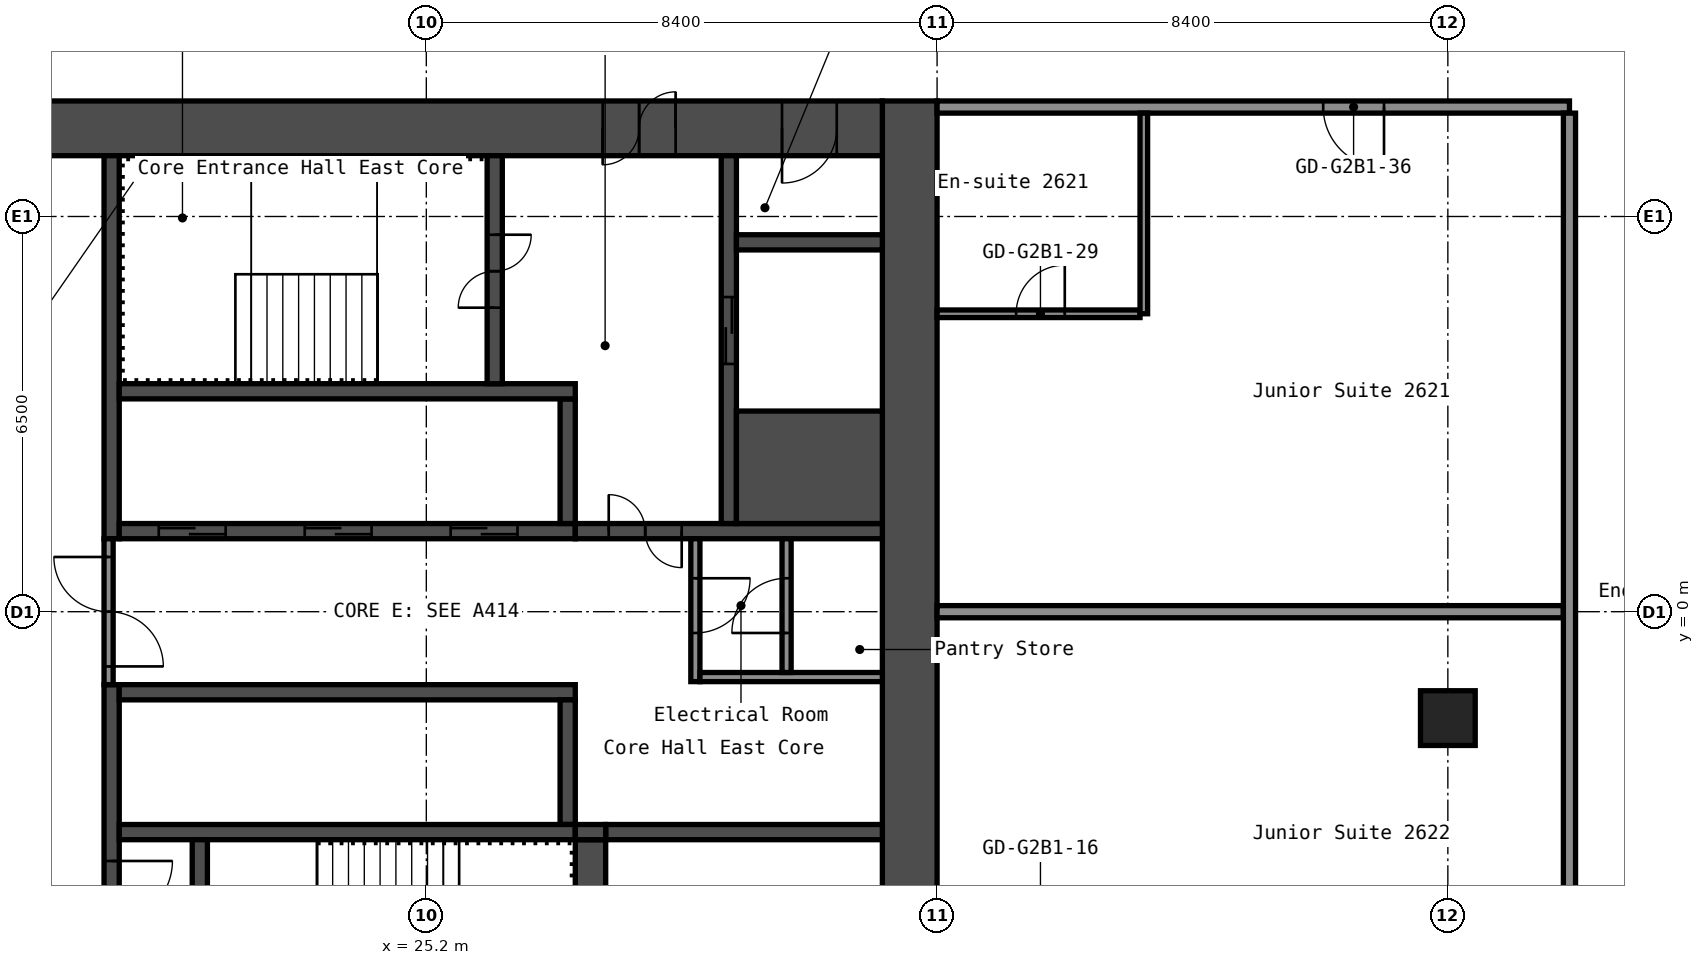
"""IFC4 building model, lengths in metres.
Left out: names, types, materials, properties, quantities, classifications, styles, units other than length and angle.
Written with IfcOpenShell. Run it as: python <this file> out.ifc"""

import sys

from ifc_helpers import new_model, si_unit, direction, frame, frame_2d, origin, origin_2d, place, context, subcontext, project, spatial, rectangle, hollow_rectangle, extrude, element, fill, save


model = new_model("IFC4")
c1 = context("Model", 3, precision=1e-05, world=origin(), true_north=direction((0.0, 1.0)))
c2 = subcontext(c1, "Body", "Model", "MODEL_VIEW")
j1 = project(units=[si_unit("LENGTHUNIT", "METRE"), si_unit("PLANEANGLEUNIT", "RADIAN")], contexts=[c1])
p1 = place(None, origin())
s1 = spatial("IfcSite", under=j1, at=p1, CompositionType="ELEMENT")
p2 = place(p1, origin())
s2 = spatial("IfcBuilding", under=s1, at=p2, CompositionType="ELEMENT")
p3 = place(p2, frame((0.0, 0.0, 94.6)))
s3 = spatial("IfcBuildingStorey", under=s2, at=p3, CompositionType="ELEMENT", Elevation=94.6)
p4 = place(p3, frame((42.0, -1.75, 0.0), z_axis=(0.0, 0.0, 1.0), x_axis=(1.0, 0.0, 0.0)))
e1 = element("IfcColumn", 1, at=p4, inside=s3, PredefinedType="COLUMN", context=c2, shape_type="SweptSolid", body=[
    extrude(hollow_rectangle(XDim=0.9, YDim=0.9, WallThickness=0.036, at=origin_2d()), origin(), (0.0, 0.0, 1.0), 2.8),
])
p5 = place(p3, frame((33.15, -8.4, 0.0), z_axis=(0.0, 0.0, 1.0), x_axis=(0.0, 1.0, 0.0)))
e2 = element("IfcWall", 2, at=p5, inside=s3, PredefinedType="SHEAR", context=c2, shape_type="SweptSolid", body=[
    extrude(rectangle(XDim=16.8, YDim=0.9, at=frame_2d((8.4, 0.0))), origin(), (0.0, 0.0, 1.0), 2.8),
])
p6 = place(p3, frame((17.7, 7.95, 0.0), z_axis=(0.0, 0.0, 1.0), x_axis=(1.0, 0.0, 0.0)))
e3 = element("IfcWall", 3, at=p6, inside=s3, PredefinedType="SHEAR", context=c2, shape_type="SweptSolid", body=[
    extrude(rectangle(XDim=15.0, YDim=0.9, at=frame_2d((7.5, 0.0))), origin(), (0.0, 0.0, 1.0), 2.8),
])
p7 = place(p6, frame((10.4, 0.0, 0.0)))
e4 = element("IfcOpeningElement", 4, at=p7, cuts=e3, PredefinedType="OPENING", context=c2, shape_type="SweptSolid", body=[
    extrude(rectangle(XDim=1.2, YDim=2.1, at=frame_2d((0.6, 1.05))), frame((0.0, 0.46, 0.0), z_axis=(0.0, -1.0, 0.0), x_axis=(1.0, 0.0, 0.0)), (0.0, 0.0, 1.0), 0.92),
])
p8 = place(p6, frame((13.35, 0.0, 0.0)))
e5 = element("IfcOpeningElement", 5, at=p8, cuts=e3, PredefinedType="OPENING", context=c2, shape_type="SweptSolid", body=[
    extrude(rectangle(XDim=0.9, YDim=2.1, at=frame_2d((0.45, 1.05))), frame((0.0, 0.46, 0.0), z_axis=(0.0, -1.0, 0.0), x_axis=(1.0, 0.0, 0.0)), (0.0, 0.0, 1.0), 0.92),
])
p9 = place(p3, frame((20.025, 1.2, 0.0), z_axis=(0.0, 0.0, 1.0), x_axis=(0.0, 1.0, 0.0)))
e6 = element("IfcWall", 6, at=p9, inside=s3, PredefinedType="SHEAR", context=c2, shape_type="SweptSolid", body=[
    extrude(rectangle(XDim=6.3, YDim=0.25, at=frame_2d((3.15, 0.0))), origin(), (0.0, 0.0, 1.0), 2.8),
])
p10 = place(p3, frame((20.025, -7.5, 0.0), z_axis=(0.0, 0.0, 1.0), x_axis=(0.0, 1.0, 0.0)))
e7 = element("IfcWall", 7, at=p10, inside=s3, PredefinedType="SHEAR", context=c2, shape_type="SweptSolid", body=[
    extrude(rectangle(XDim=6.3, YDim=0.25, at=frame_2d((3.15, 0.0))), origin(), (0.0, 0.0, 1.0), 2.8),
])
p11 = place(p10, frame((2.4, 0.0, 0.0)))
e8 = element("IfcOpeningElement", 8, at=p11, cuts=e7, PredefinedType="OPENING", context=c2, shape_type="SweptSolid", body=[
    extrude(rectangle(XDim=1.0, YDim=2.1, at=frame_2d((0.5, 1.05))), frame((0.0, 0.135, 0.0), z_axis=(0.0, -1.0, 0.0), x_axis=(1.0, 0.0, 0.0)), (0.0, 0.0, 1.0), 0.27),
])
p12 = place(p3, frame((20.15, 1.325, 0.0), z_axis=(0.0, 0.0, 1.0), x_axis=(1.0, 0.0, 0.0)))
e9 = element("IfcWall", 9, at=p12, inside=s3, PredefinedType="SHEAR", context=c2, shape_type="SweptSolid", body=[
    extrude(rectangle(XDim=7.5, YDim=0.25, at=frame_2d((3.75, 0.0))), origin(), (0.0, 0.0, 1.0), 2.8),
])
p13 = place(p12, frame((0.65, 0.0, 0.0)))
e10 = element("IfcOpeningElement", 10, at=p13, cuts=e9, PredefinedType="OPENING", context=c2, shape_type="SweptSolid", body=[
    extrude(rectangle(XDim=1.1, YDim=2.1, at=frame_2d((0.55, 1.05))), frame((0.0, 0.135, 0.0), z_axis=(0.0, -1.0, 0.0), x_axis=(1.0, 0.0, 0.0)), (0.0, 0.0, 1.0), 0.27),
])
p14 = place(p12, frame((3.05, 0.0, 0.0)))
e11 = element("IfcOpeningElement", 11, at=p14, cuts=e9, PredefinedType="OPENING", context=c2, shape_type="SweptSolid", body=[
    extrude(rectangle(XDim=1.1, YDim=2.1, at=frame_2d((0.55, 1.05))), frame((0.0, 0.135, 0.0), z_axis=(0.0, -1.0, 0.0), x_axis=(1.0, 0.0, 0.0)), (0.0, 0.0, 1.0), 0.27),
])
p15 = place(p12, frame((5.45, 0.0, 0.0)))
e12 = element("IfcOpeningElement", 12, at=p15, cuts=e9, PredefinedType="OPENING", context=c2, shape_type="SweptSolid", body=[
    extrude(rectangle(XDim=1.1, YDim=2.1, at=frame_2d((0.55, 1.05))), frame((0.0, 0.135, 0.0), z_axis=(0.0, -1.0, 0.0), x_axis=(1.0, 0.0, 0.0)), (0.0, 0.0, 1.0), 0.27),
])
p16 = place(p3, frame((27.525, 1.45, 0.0), z_axis=(0.0, 0.0, 1.0), x_axis=(0.0, 1.0, 0.0)))
e13 = element("IfcWall", 13, at=p16, inside=s3, PredefinedType="SHEAR", context=c2, shape_type="SweptSolid", body=[
    extrude(rectangle(XDim=2.05, YDim=0.25, at=frame_2d((1.025, 0.0))), origin(), (0.0, 0.0, 1.0), 2.8),
])
p17 = place(p3, frame((20.15, 3.625, 0.0), z_axis=(0.0, 0.0, 1.0), x_axis=(1.0, 0.0, 0.0)))
e14 = element("IfcWall", 14, at=p17, inside=s3, PredefinedType="SHEAR", context=c2, shape_type="SweptSolid", body=[
    extrude(rectangle(XDim=7.5, YDim=0.25, at=frame_2d((3.75, 0.0))), origin(), (0.0, 0.0, 1.0), 2.8),
])
p18 = place(p3, frame((26.325, 3.75, 0.0), z_axis=(0.0, 0.0, 1.0), x_axis=(0.0, 1.0, 0.0)))
e15 = element("IfcWall", 15, at=p18, inside=s3, PredefinedType="SHEAR", context=c2, shape_type="SweptSolid", body=[
    extrude(rectangle(XDim=3.75, YDim=0.25, at=frame_2d((1.875, 0.0))), origin(), (0.0, 0.0, 1.0), 2.8),
])
p19 = place(p18, frame((1.25, 0.0, 0.0)))
e16 = element("IfcOpeningElement", 16, at=p19, cuts=e15, PredefinedType="OPENING", context=c2, shape_type="SweptSolid", body=[
    extrude(rectangle(XDim=1.2, YDim=2.1, at=frame_2d((0.6, 1.05))), frame((0.0, 0.135, 0.0), z_axis=(0.0, -1.0, 0.0), x_axis=(1.0, 0.0, 0.0)), (0.0, 0.0, 1.0), 0.27),
])
p20 = place(p3, frame((27.65, 1.325, 0.0), z_axis=(0.0, 0.0, 1.0), x_axis=(1.0, 0.0, 0.0)))
e17 = element("IfcWall", 17, at=p20, inside=s3, PredefinedType="SHEAR", context=c2, shape_type="SweptSolid", body=[
    extrude(rectangle(XDim=5.05, YDim=0.25, at=frame_2d((2.525, 0.0))), origin(), (0.0, 0.0, 1.0), 2.8),
])
p21 = place(p20, frame((0.55, 0.0, 0.0)))
e18 = element("IfcOpeningElement", 18, at=p21, cuts=e17, PredefinedType="OPENING", context=c2, shape_type="SweptSolid", body=[
    extrude(rectangle(XDim=1.2, YDim=2.1, at=frame_2d((0.6, 1.05))), frame((0.0, 0.135, 0.0), z_axis=(0.0, -1.0, 0.0), x_axis=(1.0, 0.0, 0.0)), (0.0, 0.0, 1.0), 0.27),
])
p22 = place(p3, frame((30.175, 1.45, 0.0), z_axis=(0.0, 0.0, 1.0), x_axis=(0.0, 1.0, 0.0)))
e19 = element("IfcWall", 19, at=p22, inside=s3, PredefinedType="SHEAR", context=c2, shape_type="SweptSolid", body=[
    extrude(rectangle(XDim=6.05, YDim=0.25, at=frame_2d((3.025, 0.0))), origin(), (0.0, 0.0, 1.0), 2.8),
])
p23 = place(p22, frame((2.625, 0.0, 0.0)))
e20 = element("IfcOpeningElement", 20, at=p23, cuts=e19, PredefinedType="OPENING", context=c2, shape_type="SweptSolid", body=[
    extrude(rectangle(XDim=1.1, YDim=2.1, at=frame_2d((0.55, 1.05))), frame((0.0, 0.135, 0.0), z_axis=(0.0, -1.0, 0.0), x_axis=(1.0, 0.0, 0.0)), (0.0, 0.0, 1.0), 0.27),
])
p24 = place(p3, frame((30.3, 2.375, 0.0), z_axis=(0.0, 0.0, 1.0), x_axis=(1.0, 0.0, 0.0)))
e21 = element("IfcWall", 21, at=p24, inside=s3, PredefinedType="SHEAR", context=c2, shape_type="SweptSolid", body=[
    extrude(rectangle(XDim=2.4, YDim=1.85, at=frame_2d((1.2, 0.0))), origin(), (0.0, 0.0, 1.0), 2.8),
])
p25 = place(p3, frame((30.3, 6.075, 0.0), z_axis=(0.0, 0.0, 1.0), x_axis=(1.0, 0.0, 0.0)))
e22 = element("IfcWall", 22, at=p25, inside=s3, PredefinedType="SHEAR", context=c2, shape_type="SweptSolid", body=[
    extrude(rectangle(XDim=2.4, YDim=0.25, at=frame_2d((1.2, 0.0))), origin(), (0.0, 0.0, 1.0), 2.8),
])
p26 = place(p3, frame((20.15, -1.325, 0.0), z_axis=(0.0, 0.0, 1.0), x_axis=(1.0, 0.0, 0.0)))
e23 = element("IfcWall", 23, at=p26, inside=s3, PredefinedType="SHEAR", context=c2, shape_type="SweptSolid", body=[
    extrude(rectangle(XDim=7.5, YDim=0.25, at=frame_2d((3.75, 0.0))), origin(), (0.0, 0.0, 1.0), 2.8),
])
p27 = place(p3, frame((27.525, -3.5, 0.0), z_axis=(0.0, 0.0, 1.0), x_axis=(0.0, 1.0, 0.0)))
e24 = element("IfcWall", 24, at=p27, inside=s3, PredefinedType="SHEAR", context=c2, shape_type="SweptSolid", body=[
    extrude(rectangle(XDim=2.05, YDim=0.25, at=frame_2d((1.025, 0.0))), origin(), (0.0, 0.0, 1.0), 2.8),
])
p28 = place(p3, frame((20.15, -3.625, 0.0), z_axis=(0.0, 0.0, 1.0), x_axis=(1.0, 0.0, 0.0)))
e25 = element("IfcWall", 25, at=p28, inside=s3, PredefinedType="SHEAR", context=c2, shape_type="SweptSolid", body=[
    extrude(rectangle(XDim=7.5, YDim=0.25, at=frame_2d((3.75, 0.0))), origin(), (0.0, 0.0, 1.0), 2.8),
])
p29 = place(p3, frame((21.475, -7.5, 0.0), z_axis=(0.0, 0.0, 1.0), x_axis=(0.0, 1.0, 0.0)))
e26 = element("IfcWall", 26, at=p29, inside=s3, PredefinedType="SHEAR", context=c2, shape_type="SweptSolid", body=[
    extrude(rectangle(XDim=3.75, YDim=0.25, at=frame_2d((1.875, 0.0))), origin(), (0.0, 0.0, 1.0), 2.8),
])
p30 = place(p29, frame((1.3, 0.0, 0.0)))
e27 = element("IfcOpeningElement", 27, at=p30, cuts=e26, PredefinedType="OPENING", context=c2, shape_type="SweptSolid", body=[
    extrude(rectangle(XDim=1.2, YDim=2.1, at=frame_2d((0.6, 1.05))), frame((0.0, 0.135, 0.0), z_axis=(0.0, -1.0, 0.0), x_axis=(1.0, 0.0, 0.0)), (0.0, 0.0, 1.0), 0.27),
])
p31 = place(p3, frame((27.9, -7.5, 0.0), z_axis=(0.0, 0.0, 1.0), x_axis=(0.0, 1.0, 0.0)))
e28 = element("IfcWall", 28, at=p31, inside=s3, PredefinedType="SHEAR", context=c2, shape_type="SweptSolid", body=[
    extrude(rectangle(XDim=3.75, YDim=0.5, at=frame_2d((1.875, 0.0))), origin(), (0.0, 0.0, 1.0), 2.8),
])
p32 = place(p3, frame((28.15, -3.625, 0.0), z_axis=(0.0, 0.0, 1.0), x_axis=(1.0, 0.0, 0.0)))
e29 = element("IfcWall", 29, at=p32, inside=s3, PredefinedType="SHEAR", context=c2, shape_type="SweptSolid", body=[
    extrude(rectangle(XDim=4.55, YDim=0.25, at=frame_2d((2.275, 0.0))), origin(), (0.0, 0.0, 1.0), 2.8),
])
p33 = place(p3, frame((27.65, -3.625, 0.0), z_axis=(0.0, 0.0, 1.0), x_axis=(1.0, 0.0, 0.0)))
e30 = element("IfcWall", 30, at=p33, inside=s3, PredefinedType="SHEAR", context=c2, shape_type="SweptSolid", body=[
    extrude(rectangle(XDim=0.5, YDim=0.25, at=frame_2d((0.25, 0.0))), origin(), (0.0, 0.0, 1.0), 2.8),
])
p34 = place(p3, frame((19.975, -1.2, 0.0), z_axis=(0.0, 0.0, 1.0), x_axis=(0.0, 1.0, 0.0)))
e31 = element("IfcWall", 31, at=p34, inside=s3, PredefinedType="PARTITIONING", context=c2, shape_type="SweptSolid", body=[
    extrude(rectangle(XDim=2.4, YDim=0.15, at=frame_2d((1.2, 0.0))), origin(), (0.0, 0.0, 1.0), 2.8),
])
p35 = place(p34, frame((0.3, 0.0, 0.0)))
e32 = element("IfcOpeningElement", 32, at=p35, cuts=e31, PredefinedType="OPENING", context=c2, shape_type="SweptSolid", body=[
    extrude(rectangle(XDim=1.8, YDim=2.1, at=frame_2d((0.9, 1.05))), frame((0.0, 0.085, 0.0), z_axis=(0.0, -1.0, 0.0), x_axis=(1.0, 0.0, 0.0)), (0.0, 0.0, 1.0), 0.17),
])
p36 = place(p3, frame((29.625, -1.15, 0.0), z_axis=(0.0, 0.0, 1.0), x_axis=(0.0, 1.0, 0.0)))
e33 = element("IfcWall", 33, at=p36, inside=s3, PredefinedType="PARTITIONING", context=c2, shape_type="SweptSolid", body=[
    extrude(rectangle(XDim=2.35, YDim=0.15, at=frame_2d((1.175, 0.0))), origin(), (0.0, 0.0, 1.0), 2.8),
])
p37 = place(p36, frame((0.8, 0.0, 0.0)))
e34 = element("IfcOpeningElement", 34, at=p37, cuts=e33, PredefinedType="OPENING", context=c2, shape_type="SweptSolid", body=[
    extrude(rectangle(XDim=0.9, YDim=2.1, at=frame_2d((0.45, 1.05))), frame((0.0, 0.085, 0.0), z_axis=(0.0, -1.0, 0.0), x_axis=(1.0, 0.0, 0.0)), (0.0, 0.0, 1.0), 0.17),
])
p38 = place(p3, frame((29.7, -1.075, 0.0), z_axis=(0.0, 0.0, 1.0), x_axis=(1.0, 0.0, 0.0)))
e35 = element("IfcWall", 35, at=p38, inside=s3, PredefinedType="PARTITIONING", context=c2, shape_type="SweptSolid", body=[
    extrude(rectangle(XDim=3.0, YDim=0.15, at=frame_2d((1.5, 0.0))), origin(), (0.0, 0.0, 1.0), 2.8),
])
p39 = place(p3, frame((31.125, -1.0, 0.0), z_axis=(0.0, 0.0, 1.0), x_axis=(0.0, 1.0, 0.0)))
e36 = element("IfcWall", 36, at=p39, inside=s3, PredefinedType="PARTITIONING", context=c2, shape_type="SweptSolid", body=[
    extrude(rectangle(XDim=2.2, YDim=0.15, at=frame_2d((1.1, 0.0))), origin(), (0.0, 0.0, 1.0), 2.8),
])
p40 = place(p39, frame((0.65, 0.0, 0.0)))
e37 = element("IfcOpeningElement", 37, at=p40, cuts=e36, PredefinedType="OPENING", context=c2, shape_type="SweptSolid", body=[
    extrude(rectangle(XDim=0.9, YDim=2.1, at=frame_2d((0.45, 1.05))), frame((0.0, 0.085, 0.0), z_axis=(0.0, -1.0, 0.0), x_axis=(1.0, 0.0, 0.0)), (0.0, 0.0, 1.0), 0.17),
])
p41 = place(p3, frame((33.6, 0.0, 0.0), z_axis=(0.0, 0.0, 1.0), x_axis=(1.0, 0.0, 0.0)))
e38 = element("IfcWall", 38, at=p41, inside=s3, PredefinedType="PARTITIONING", context=c2, shape_type="SweptSolid", body=[
    extrude(rectangle(XDim=10.3, YDim=0.2, at=frame_2d((5.15, 0.0))), origin(), (0.0, 0.0, 1.0), 2.8),
])
p42 = place(p3, frame((33.6, 4.9, 0.0), z_axis=(0.0, 0.0, 1.0), x_axis=(1.0, 0.0, 0.0)))
e39 = element("IfcWall", 39, at=p42, inside=s3, PredefinedType="PARTITIONING", context=c2, shape_type="SweptSolid", body=[
    extrude(rectangle(XDim=3.337, YDim=0.125, at=frame_2d((1.669, 0.0))), origin(), (0.0, 0.0, 1.0), 2.8),
])
p43 = place(p42, frame((1.3, 0.0, 0.0)))
e40 = element("IfcOpeningElement", 40, at=p43, cuts=e39, PredefinedType="OPENING", context=c2, shape_type="SweptSolid", body=[
    extrude(rectangle(XDim=0.8, YDim=2.1, at=frame_2d((0.4, 1.05))), frame((0.0, 0.073, 0.0), z_axis=(0.0, -1.0, 0.0), x_axis=(1.0, 0.0, 0.0)), (0.0, 0.0, 1.0), 0.145),
])
p44 = place(p3, frame((33.6, 8.3, 0.0), z_axis=(0.0, 0.0, 1.0), x_axis=(1.0, 0.0, 0.0)))
e41 = element("IfcWall", 41, at=p44, inside=s3, PredefinedType="PARTITIONING", context=c2, shape_type="SweptSolid", body=[
    extrude(rectangle(XDim=10.4, YDim=0.2, at=frame_2d((5.2, 0.0))), origin(), (0.0, 0.0, 1.0), 2.8),
])
p45 = place(p44, frame((6.35, 0.0, 0.0)))
e42 = element("IfcOpeningElement", 42, at=p45, cuts=e41, PredefinedType="OPENING", context=c2, shape_type="SweptSolid", body=[
    extrude(rectangle(XDim=1.0, YDim=2.1, at=frame_2d((0.5, 1.05))), frame((0.0, 0.11, 0.0), z_axis=(0.0, -1.0, 0.0), x_axis=(1.0, 0.0, 0.0)), (0.0, 0.0, 1.0), 0.22),
])
p46 = place(p3, frame((37.0, 4.9, 0.0), z_axis=(0.0, 0.0, 1.0), x_axis=(0.0, 1.0, 0.0)))
e43 = element("IfcWall", 43, at=p46, inside=s3, PredefinedType="PARTITIONING", context=c2, shape_type="SweptSolid", body=[
    extrude(rectangle(XDim=3.3, YDim=0.125, at=frame_2d((1.65, 0.0))), origin(), (0.0, 0.0, 1.0), 2.8),
])
p47 = place(p3, frame((44.0, -8.2, 0.0), z_axis=(0.0, 0.0, 1.0), x_axis=(0.0, 1.0, 0.0)))
e44 = element("IfcWall", 44, at=p47, inside=s3, PredefinedType="PARTITIONING", context=c2, shape_type="SweptSolid", body=[
    extrude(rectangle(XDim=16.4, YDim=0.2, at=frame_2d((8.2, 0.0))), origin(), (0.0, 0.0, 1.0), 2.8),
])
p48 = place(p7, origin())
e45 = element("IfcDoor", 45, at=p48, inside=s3, OperationType="DOUBLE_DOOR_SINGLE_SWING", PredefinedType="DOOR", context=c2, shape_type="SweptSolid", body=[
    extrude(rectangle(XDim=1.2, YDim=2.1, at=frame_2d((0.6, 1.05))), frame((0.0, 0.025, 0.0), z_axis=(0.0, -1.0, 0.0), x_axis=(1.0, 0.0, 0.0)), (0.0, 0.0, 1.0), 0.05),
])
fill(e4, e45)
p49 = place(p8, origin())
e46 = element("IfcDoor", 46, at=p49, inside=s3, OperationType="SINGLE_SWING_LEFT", PredefinedType="DOOR", context=c2, shape_type="SweptSolid", body=[
    extrude(rectangle(XDim=0.9, YDim=2.1, at=frame_2d((0.45, 1.05))), frame((0.0, 0.025, 0.0), z_axis=(0.0, -1.0, 0.0), x_axis=(1.0, 0.0, 0.0)), (0.0, 0.0, 1.0), 0.05),
])
fill(e5, e46)
p50 = place(p19, origin())
e47 = element("IfcDoor", 47, at=p50, inside=s3, OperationType="DOUBLE_DOOR_SINGLE_SWING", PredefinedType="DOOR", context=c2, shape_type="SweptSolid", body=[
    extrude(rectangle(XDim=1.2, YDim=2.1, at=frame_2d((0.6, 1.05))), frame((0.0, 0.025, 0.0), z_axis=(0.0, -1.0, 0.0), x_axis=(1.0, 0.0, 0.0)), (0.0, 0.0, 1.0), 0.05),
])
fill(e16, e47)
p51 = place(p11, origin())
e48 = element("IfcDoor", 48, at=p51, inside=s3, OperationType="SINGLE_SWING_RIGHT", PredefinedType="DOOR", context=c2, shape_type="SweptSolid", body=[
    extrude(rectangle(XDim=1.0, YDim=2.1, at=frame_2d((0.5, 1.05))), frame((0.0, 0.025, 0.0), z_axis=(0.0, -1.0, 0.0), x_axis=(1.0, 0.0, 0.0)), (0.0, 0.0, 1.0), 0.05),
])
fill(e8, e48)
p52 = place(p21, origin())
e49 = element("IfcDoor", 49, at=p52, inside=s3, OperationType="DOUBLE_DOOR_SINGLE_SWING", PredefinedType="DOOR", context=c2, shape_type="SweptSolid", body=[
    extrude(rectangle(XDim=1.2, YDim=2.1, at=frame_2d((0.6, 1.05))), frame((0.0, 0.025, 0.0), z_axis=(0.0, -1.0, 0.0), x_axis=(1.0, 0.0, 0.0)), (0.0, 0.0, 1.0), 0.05),
])
fill(e18, e49)
p53 = place(p35, origin())
e50 = element("IfcDoor", 50, at=p53, inside=s3, OperationType="DOUBLE_DOOR_SINGLE_SWING", PredefinedType="DOOR", context=c2, shape_type="SweptSolid", body=[
    extrude(rectangle(XDim=1.8, YDim=2.1, at=frame_2d((0.9, 1.05))), frame((0.0, 0.025, 0.0), z_axis=(0.0, -1.0, 0.0), x_axis=(1.0, 0.0, 0.0)), (0.0, 0.0, 1.0), 0.05),
])
fill(e32, e50)
p54 = place(p37, origin())
e51 = element("IfcDoor", 51, at=p54, inside=s3, OperationType="SINGLE_SWING_RIGHT", PredefinedType="DOOR", context=c2, shape_type="SweptSolid", body=[
    extrude(rectangle(XDim=0.9, YDim=2.1, at=frame_2d((0.45, 1.05))), frame((0.0, 0.025, 0.0), z_axis=(0.0, -1.0, 0.0), x_axis=(1.0, 0.0, 0.0)), (0.0, 0.0, 1.0), 0.05),
])
fill(e34, e51)
p55 = place(p40, origin())
e52 = element("IfcDoor", 52, at=p55, inside=s3, OperationType="SINGLE_SWING_RIGHT", PredefinedType="DOOR", context=c2, shape_type="SweptSolid", body=[
    extrude(rectangle(XDim=0.9, YDim=2.1, at=frame_2d((0.45, 1.05))), frame((0.0, 0.025, 0.0), z_axis=(0.0, -1.0, 0.0), x_axis=(1.0, 0.0, 0.0)), (0.0, 0.0, 1.0), 0.05),
])
fill(e37, e52)
p56 = place(p13, origin())
e53 = element("IfcDoor", 53, at=p56, inside=s3, OperationType="DOUBLE_DOOR_SLIDING", PredefinedType="DOOR", context=c2, shape_type="SweptSolid", body=[
    extrude(rectangle(XDim=1.1, YDim=2.1, at=frame_2d((0.55, 1.05))), frame((0.0, 0.025, 0.0), z_axis=(0.0, -1.0, 0.0), x_axis=(1.0, 0.0, 0.0)), (0.0, 0.0, 1.0), 0.05),
])
fill(e10, e53)
p57 = place(p14, origin())
e54 = element("IfcDoor", 54, at=p57, inside=s3, OperationType="DOUBLE_DOOR_SLIDING", PredefinedType="DOOR", context=c2, shape_type="SweptSolid", body=[
    extrude(rectangle(XDim=1.1, YDim=2.1, at=frame_2d((0.55, 1.05))), frame((0.0, 0.025, 0.0), z_axis=(0.0, -1.0, 0.0), x_axis=(1.0, 0.0, 0.0)), (0.0, 0.0, 1.0), 0.05),
])
fill(e11, e54)
p58 = place(p15, origin())
e55 = element("IfcDoor", 55, at=p58, inside=s3, OperationType="DOUBLE_DOOR_SLIDING", PredefinedType="DOOR", context=c2, shape_type="SweptSolid", body=[
    extrude(rectangle(XDim=1.1, YDim=2.1, at=frame_2d((0.55, 1.05))), frame((0.0, 0.025, 0.0), z_axis=(0.0, -1.0, 0.0), x_axis=(1.0, 0.0, 0.0)), (0.0, 0.0, 1.0), 0.05),
])
fill(e12, e55)
p59 = place(p23, origin())
e56 = element("IfcDoor", 56, at=p59, inside=s3, OperationType="DOUBLE_DOOR_SLIDING", PredefinedType="DOOR", context=c2, shape_type="SweptSolid", body=[
    extrude(rectangle(XDim=1.1, YDim=2.1, at=frame_2d((0.55, 1.05))), frame((0.0, 0.025, 0.0), z_axis=(0.0, -1.0, 0.0), x_axis=(1.0, 0.0, 0.0)), (0.0, 0.0, 1.0), 0.05),
])
fill(e20, e56)
p60 = place(p43, origin())
e57 = element("IfcDoor", 57, at=p60, inside=s3, OperationType="SINGLE_SWING_LEFT", PredefinedType="DOOR", context=c2, shape_type="SweptSolid", body=[
    extrude(rectangle(XDim=0.8, YDim=2.1, at=frame_2d((0.4, 1.05))), frame((0.0, 0.025, 0.0), z_axis=(0.0, -1.0, 0.0), x_axis=(1.0, 0.0, 0.0)), (0.0, 0.0, 1.0), 0.05),
])
fill(e40, e57)
p61 = place(p45, origin())
e58 = element("IfcDoor", 58, at=p61, inside=s3, OperationType="SINGLE_SWING_RIGHT", PredefinedType="DOOR", context=c2, shape_type="SweptSolid", body=[
    extrude(rectangle(XDim=1.0, YDim=2.1, at=frame_2d((0.5, 1.05))), frame((0.0, 0.025, 0.0), z_axis=(0.0, -1.0, 0.0), x_axis=(1.0, 0.0, 0.0)), (0.0, 0.0, 1.0), 0.05),
])
fill(e42, e58)
save(model, sys.argv[1])
